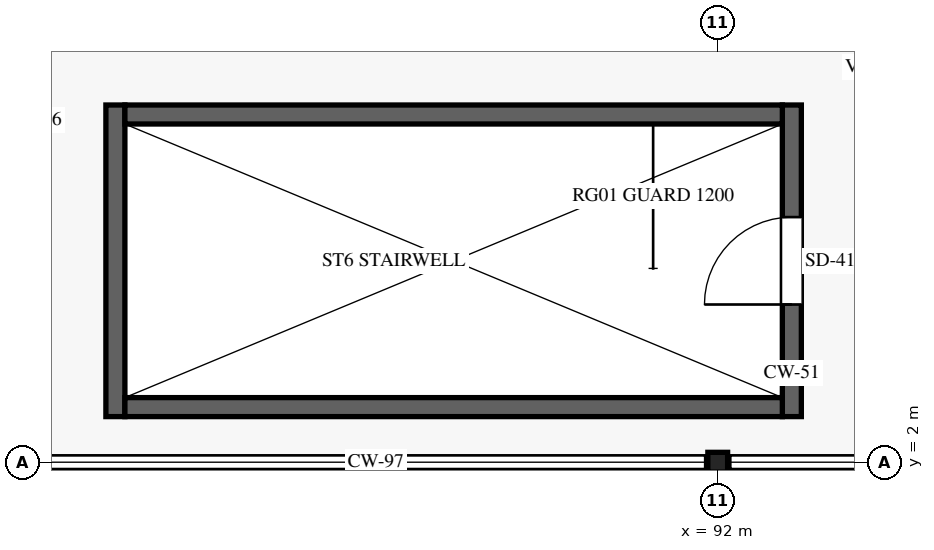
"""IFC4 building model, lengths in metres.
Left out: names, types, materials, properties, quantities, classifications, styles, units other than length and angle.
Written with IfcOpenShell. Run it as: python <this file> out.ifc"""

import sys

from ifc_helpers import new_model, si_unit, direction, frame, frame_2d, origin, origin_2d, place, context, subcontext, project, spatial, rectangle, i_section, extrude, element, fill, save


model = new_model("IFC4")
c1 = context("Model", 3, precision=1e-05, world=origin(), true_north=direction((0.0, 1.0)))
c2 = subcontext(c1, "Body", "Model", "MODEL_VIEW")
j1 = project(units=[si_unit("LENGTHUNIT", "METRE"), si_unit("PLANEANGLEUNIT", "RADIAN")], contexts=[c1])
p1 = place(None, origin())
s1 = spatial("IfcSite", under=j1, at=p1, CompositionType="ELEMENT")
p2 = place(p1, origin())
s2 = spatial("IfcBuilding", under=s1, at=p2, CompositionType="ELEMENT")
p3 = place(p2, frame((0.0, 0.0, 10.2)))
s3 = spatial("IfcBuildingStorey", under=s2, at=p3, CompositionType="ELEMENT", Elevation=10.2)
p4 = place(p3, frame((92.0, 2.0, 0.0), z_axis=(0.0, 0.0, 1.0), x_axis=(1.0, 0.0, 0.0)))
e1 = element("IfcColumn", 1, at=p4, inside=s3, PredefinedType="COLUMN", context=c2, shape_type="SweptSolid", body=[
    extrude(i_section(OverallWidth=0.26, OverallDepth=0.26, WebThickness=0.01, FlangeThickness=0.018, FilletRadius=0.024, at=origin_2d()), origin(), (0.0, 0.0, 1.0), 4.8),
])
p5 = place(p3, frame((92.975, 2.6, 0.0), z_axis=(0.0, 0.0, 1.0), x_axis=(0.0, 1.0, 0.0)))
e2 = element("IfcWall", 2, at=p5, inside=s3, PredefinedType="SHEAR", context=c2, shape_type="SweptSolid", body=[
    extrude(rectangle(XDim=4.1, YDim=0.25, at=frame_2d((2.05, 0.0))), origin(), (0.0, 0.0, 1.0), 4.52),
])
p6 = place(p5, frame((1.475, 0.0, 0.0)))
e3 = element("IfcOpeningElement", 3, at=p6, cuts=e2, PredefinedType="OPENING", context=c2, shape_type="SweptSolid", body=[
    extrude(rectangle(XDim=1.15, YDim=2.2, at=frame_2d((0.575, 1.1))), frame((0.0, 0.135, 0.0), z_axis=(0.0, -1.0, 0.0), x_axis=(1.0, 0.0, 0.0)), (0.0, 0.0, 1.0), 0.27),
])
p7 = place(p3, frame((84.075, 2.6, 0.0), z_axis=(0.0, 0.0, 1.0), x_axis=(0.0, 1.0, 0.0)))
e4 = element("IfcWall", 4, at=p7, inside=s3, PredefinedType="SHEAR", context=c2, shape_type="SweptSolid", body=[
    extrude(rectangle(XDim=4.1, YDim=0.25, at=frame_2d((2.05, 0.0))), origin(), (0.0, 0.0, 1.0), 4.52),
])
for number, where, z_axis, x_axis in (
    (5, (84.2, 2.725, 0.0), (0.0, 0.0, 1.0), (1.0, 0.0, 0.0)),
    (6, (84.2, 6.575, 0.0), (0.0, 0.0, 1.0), (1.0, 0.0, 0.0)),
):
    element("IfcWall", number, at=place(p3, frame(where, z_axis=z_axis, x_axis=x_axis)), inside=s3, PredefinedType="SHEAR", context=c2, shape_type="SweptSolid", body=[
        extrude(rectangle(XDim=8.65, YDim=0.25, at=frame_2d((4.325, 0.0))), origin(), (0.0, 0.0, 1.0), 4.52),
    ])
p8 = place(p6, origin())
e7 = element("IfcDoor", 7, at=p8, inside=s3, OperationType="SINGLE_SWING_LEFT", PredefinedType="DOOR", context=c2, shape_type="SweptSolid", body=[
    extrude(rectangle(XDim=1.15, YDim=2.2, at=frame_2d((0.575, 1.1))), frame((0.0, 0.025, 0.0), z_axis=(0.0, -1.0, 0.0), x_axis=(1.0, 0.0, 0.0)), (0.0, 0.0, 1.0), 0.05),
])
fill(e3, e7)
save(model, sys.argv[1])
